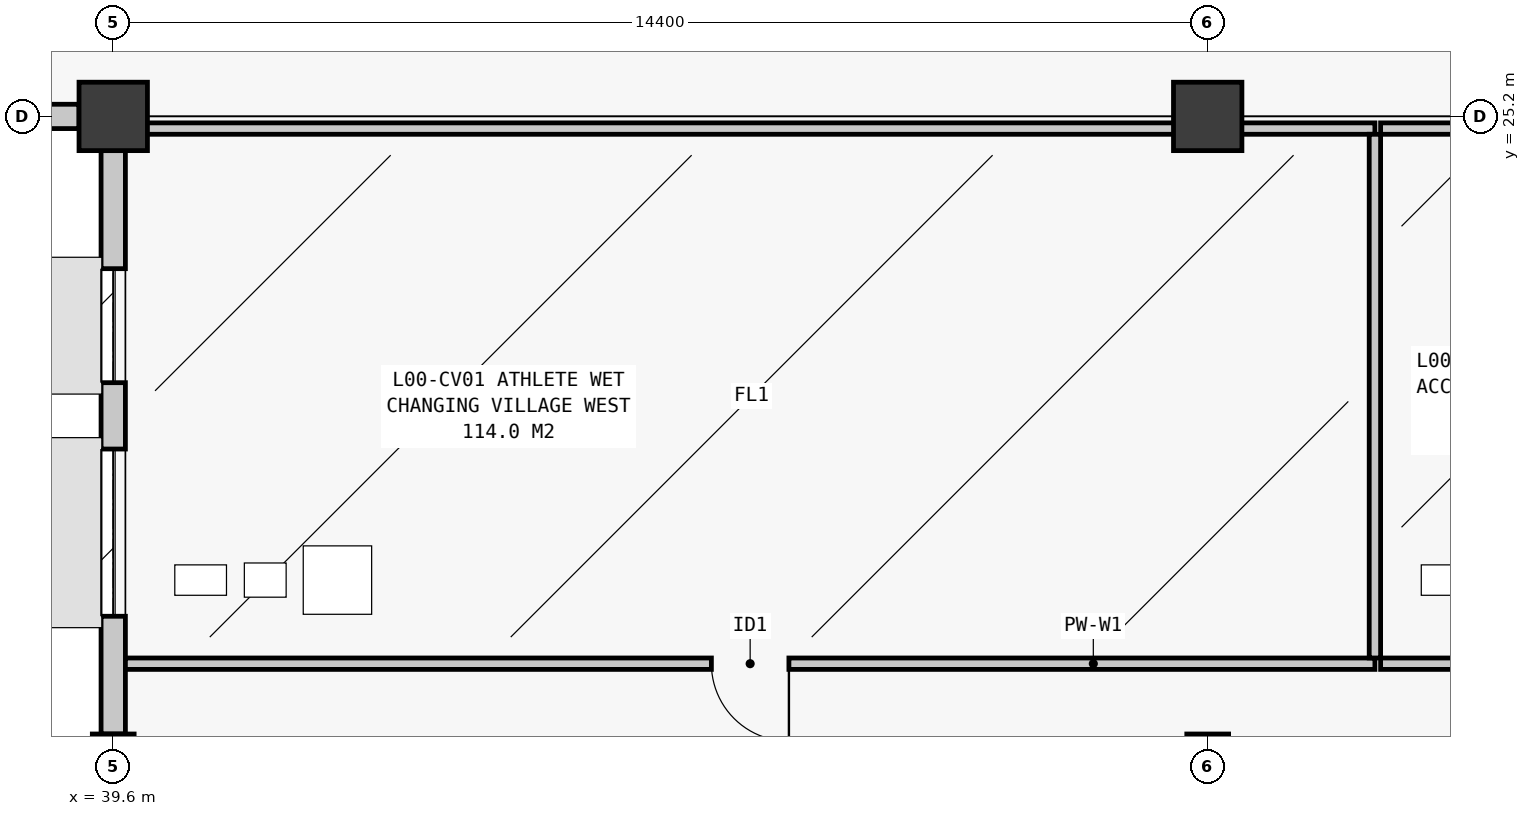
"""IFC4 building model, lengths in metres.
Left out: names, types, materials, properties, quantities, classifications, styles, units other than length and angle.
Written with IfcOpenShell. Run it as: python <this file> out.ifc"""

import sys

from ifc_helpers import new_model, si_unit, direction, frame, frame_2d, origin, origin_2d, place, context, subcontext, project, spatial, rectangle, extrude, element, fill, save


model = new_model("IFC4")
c1 = context("Model", 3, precision=1e-05, world=origin(), true_north=direction((0.0, 1.0)))
c2 = subcontext(c1, "Body", "Model", "MODEL_VIEW")
j1 = project(units=[si_unit("LENGTHUNIT", "METRE"), si_unit("PLANEANGLEUNIT", "RADIAN")], contexts=[c1])
p1 = place(None, origin())
s1 = spatial("IfcSite", under=j1, at=p1, CompositionType="ELEMENT")
p2 = place(p1, origin())
s2 = spatial("IfcBuilding", under=s1, at=p2, CompositionType="ELEMENT")
p3 = place(p2, origin())
s3 = spatial("IfcBuildingStorey", under=s2, at=p3, CompositionType="ELEMENT", Elevation=0.0)
p4 = place(p3, frame((39.6, 16.8, 0.0), z_axis=(0.0, 0.0, 1.0), x_axis=(1.0, 0.0, 0.0)))
e1 = element("IfcColumn", 1, at=p4, inside=s3, PredefinedType="COLUMN", context=c2, shape_type="SweptSolid", body=[
    extrude(rectangle(XDim=0.55, YDim=0.55, at=origin_2d()), origin(), (0.0, 0.0, 1.0), 4.8),
])
p5 = place(p3, frame((39.6, 25.2, 0.0), z_axis=(0.0, 0.0, 1.0), x_axis=(1.0, 0.0, 0.0)))
e2 = element("IfcColumn", 2, at=p5, inside=s3, PredefinedType="COLUMN", context=c2, shape_type="SweptSolid", body=[
    extrude(rectangle(XDim=0.9, YDim=0.9, at=origin_2d()), origin(), (0.0, 0.0, 1.0), 4.8),
])
p6 = place(p3, frame((54.0, 16.8, 0.0), z_axis=(0.0, 0.0, 1.0), x_axis=(1.0, 0.0, 0.0)))
e3 = element("IfcColumn", 3, at=p6, inside=s3, PredefinedType="COLUMN", context=c2, shape_type="SweptSolid", body=[
    extrude(rectangle(XDim=0.55, YDim=0.55, at=origin_2d()), origin(), (0.0, 0.0, 1.0), 4.8),
])
p7 = place(p3, frame((54.0, 25.2, 0.0), z_axis=(0.0, 0.0, 1.0), x_axis=(1.0, 0.0, 0.0)))
e4 = element("IfcColumn", 4, at=p7, inside=s3, PredefinedType="COLUMN", context=c2, shape_type="SweptSolid", body=[
    extrude(rectangle(XDim=0.9, YDim=0.9, at=origin_2d()), origin(), (0.0, 0.0, 1.0), 4.8),
])
p8 = place(p3, frame((39.6, 24.75, 0.0), z_axis=(0.0, 0.0, 1.0), x_axis=(0.0, -1.0, 0.0)))
e5 = element("IfcWall", 5, at=p8, inside=s3, PredefinedType="STANDARD", context=c2, shape_type="SweptSolid", body=[
    extrude(rectangle(XDim=7.675, YDim=0.32, at=frame_2d((3.837, 0.0))), origin(), (0.0, 0.0, 1.0), 3.976),
])
p9 = place(p8, frame((1.553, 0.0, 1.05)))
e6 = element("IfcOpeningElement", 6, at=p9, cuts=e5, PredefinedType="OPENING", context=c2, shape_type="SweptSolid", body=[
    extrude(rectangle(XDim=1.5, YDim=1.5, at=frame_2d((0.75, 0.75))), frame((0.0, 0.175, 0.0), z_axis=(0.0, -1.0, 0.0), x_axis=(1.0, 0.0, 0.0)), (0.0, 0.0, 1.0), 0.35),
])
p10 = place(p8, frame((3.926, 0.0, 0.95)))
e7 = element("IfcOpeningElement", 7, at=p10, cuts=e5, PredefinedType="OPENING", context=c2, shape_type="SweptSolid", body=[
    extrude(rectangle(XDim=2.2, YDim=1.65, at=frame_2d((1.1, 0.825))), frame((0.0, 0.175, 0.0), z_axis=(0.0, -1.0, 0.0), x_axis=(1.0, 0.0, 0.0)), (0.0, 0.0, 1.0), 0.35),
])
p11 = place(p3, frame((25.65, 25.2, 0.0), z_axis=(0.0, 0.0, 1.0), x_axis=(1.0, 0.0, 0.0)))
e8 = element("IfcWall", 8, at=p11, inside=s3, PredefinedType="STANDARD", context=c2, shape_type="SweptSolid", body=[
    extrude(rectangle(XDim=13.5, YDim=0.32, at=frame_2d((6.75, 0.0))), origin(), (0.0, 0.0, 1.0), 3.833),
])
p12 = place(p11, frame((5.75, 0.0, 0.0)))
e9 = element("IfcOpeningElement", 9, at=p12, cuts=e8, PredefinedType="OPENING", context=c2, shape_type="SweptSolid", body=[
    extrude(rectangle(XDim=2.0, YDim=2.4, at=frame_2d((1.0, 1.2))), frame((0.0, 0.175, 0.0), z_axis=(0.0, -1.0, 0.0), x_axis=(1.0, 0.0, 0.0)), (0.0, 0.0, 1.0), 0.35),
])
p13 = place(p11, frame((2.28, 0.0, 0.9)))
e10 = element("IfcOpeningElement", 10, at=p13, cuts=e8, PredefinedType="OPENING", context=c2, shape_type="SweptSolid", body=[
    extrude(rectangle(XDim=3.0, YDim=1.8, at=frame_2d((1.5, 0.9))), frame((0.0, 0.175, 0.0), z_axis=(0.0, -1.0, 0.0), x_axis=(1.0, 0.0, 0.0)), (0.0, 0.0, 1.0), 0.35),
])
p14 = place(p11, frame((8.37, 0.0, 1.05)))
e11 = element("IfcOpeningElement", 11, at=p14, cuts=e8, PredefinedType="OPENING", context=c2, shape_type="SweptSolid", body=[
    extrude(rectangle(XDim=2.7, YDim=1.5, at=frame_2d((1.35, 0.75))), frame((0.0, 0.175, 0.0), z_axis=(0.0, -1.0, 0.0), x_axis=(1.0, 0.0, 0.0)), (0.0, 0.0, 1.0), 0.35),
])
p15 = place(p3, frame((39.76, 18.0, 0.0), z_axis=(0.0, 0.0, 1.0), x_axis=(1.0, 0.0, 0.0)))
e12 = element("IfcWall", 12, at=p15, inside=s3, PredefinedType="PLUMBINGWALL", context=c2, shape_type="SweptSolid", body=[
    extrude(rectangle(XDim=16.44, YDim=0.15, at=frame_2d((8.22, 0.0))), origin(), (0.0, 0.0, 1.0), 4.52),
])
p16 = place(p15, frame((7.71, 0.0, 0.0)))
e13 = element("IfcOpeningElement", 13, at=p16, cuts=e12, PredefinedType="OPENING", context=c2, shape_type="SweptSolid", body=[
    extrude(rectangle(XDim=1.02, YDim=2.15, at=frame_2d((0.51, 1.075))), frame((0.0, 0.09, 0.0), z_axis=(0.0, -1.0, 0.0), x_axis=(1.0, 0.0, 0.0)), (0.0, 0.0, 1.0), 0.18),
])
p17 = place(p3, frame((39.76, 25.04, 0.0), z_axis=(0.0, 0.0, 1.0), x_axis=(1.0, 0.0, 0.0)))
e14 = element("IfcWall", 14, at=p17, inside=s3, PredefinedType="PLUMBINGWALL", context=c2, shape_type="SweptSolid", body=[
    extrude(rectangle(XDim=16.44, YDim=0.15, at=frame_2d((8.22, 0.0))), origin(), (0.0, 0.0, 1.0), 3.833),
])
p18 = place(p3, frame((56.2, 18.075, 0.0), z_axis=(0.0, 0.0, 1.0), x_axis=(0.0, 1.0, 0.0)))
e15 = element("IfcWall", 15, at=p18, inside=s3, PredefinedType="PLUMBINGWALL", context=c2, shape_type="SweptSolid", body=[
    extrude(rectangle(XDim=6.89, YDim=0.15, at=frame_2d((3.445, 0.0))), origin(), (0.0, 0.0, 1.0), 4.52),
])
p19 = place(p3, frame((56.275, 18.0, 0.0), z_axis=(0.0, 0.0, 1.0), x_axis=(1.0, 0.0, 0.0)))
e16 = element("IfcWall", 16, at=p19, inside=s3, PredefinedType="PLUMBINGWALL", context=c2, shape_type="SweptSolid", body=[
    extrude(rectangle(XDim=12.125, YDim=0.15, at=frame_2d((6.062, 0.0))), origin(), (0.0, 0.0, 1.0), 4.52),
])
p20 = place(p19, frame((5.552, 0.0, 0.0)))
e17 = element("IfcOpeningElement", 17, at=p20, cuts=e16, PredefinedType="OPENING", context=c2, shape_type="SweptSolid", body=[
    extrude(rectangle(XDim=1.02, YDim=2.15, at=frame_2d((0.51, 1.075))), frame((0.0, 0.09, 0.0), z_axis=(0.0, -1.0, 0.0), x_axis=(1.0, 0.0, 0.0)), (0.0, 0.0, 1.0), 0.18),
])
p21 = place(p3, frame((56.275, 25.04, 0.0), z_axis=(0.0, 0.0, 1.0), x_axis=(1.0, 0.0, 0.0)))
e18 = element("IfcWall", 18, at=p21, inside=s3, PredefinedType="PLUMBINGWALL", context=c2, shape_type="SweptSolid", body=[
    extrude(rectangle(XDim=12.125, YDim=0.15, at=frame_2d((6.062, 0.0))), origin(), (0.0, 0.0, 1.0), 3.833),
])
p22 = place(p9, origin())
e19 = element("IfcWindow", 19, at=p22, inside=s3, PartitioningType="SINGLE_PANEL", PredefinedType="WINDOW", context=c2, shape_type="SweptSolid", body=[
    extrude(rectangle(XDim=1.5, YDim=1.5, at=frame_2d((0.75, 0.75))), frame((0.0, 0.03, 0.0), z_axis=(0.0, -1.0, 0.0), x_axis=(1.0, 0.0, 0.0)), (0.0, 0.0, 1.0), 0.06),
])
fill(e6, e19)
p23 = place(p10, origin())
e20 = element("IfcWindow", 20, at=p23, inside=s3, PartitioningType="SINGLE_PANEL", PredefinedType="WINDOW", context=c2, shape_type="SweptSolid", body=[
    extrude(rectangle(XDim=2.2, YDim=1.65, at=frame_2d((1.1, 0.825))), frame((0.0, 0.03, 0.0), z_axis=(0.0, -1.0, 0.0), x_axis=(1.0, 0.0, 0.0)), (0.0, 0.0, 1.0), 0.06),
])
fill(e7, e20)
p24 = place(p16, frame((1.02, 0.0, 0.0), z_axis=(0.0, 0.0, 1.0), x_axis=(-1.0, 0.0, 0.0)))
e21 = element("IfcDoor", 21, at=p24, inside=s3, OperationType="SINGLE_SWING_RIGHT", PredefinedType="DOOR", context=c2, shape_type="SweptSolid", body=[
    extrude(rectangle(XDim=1.02, YDim=2.15, at=frame_2d((0.51, 1.075))), frame((0.0, 0.025, 0.0), z_axis=(0.0, -1.0, 0.0), x_axis=(1.0, 0.0, 0.0)), (0.0, 0.0, 1.0), 0.05),
])
fill(e13, e21)
save(model, sys.argv[1])
